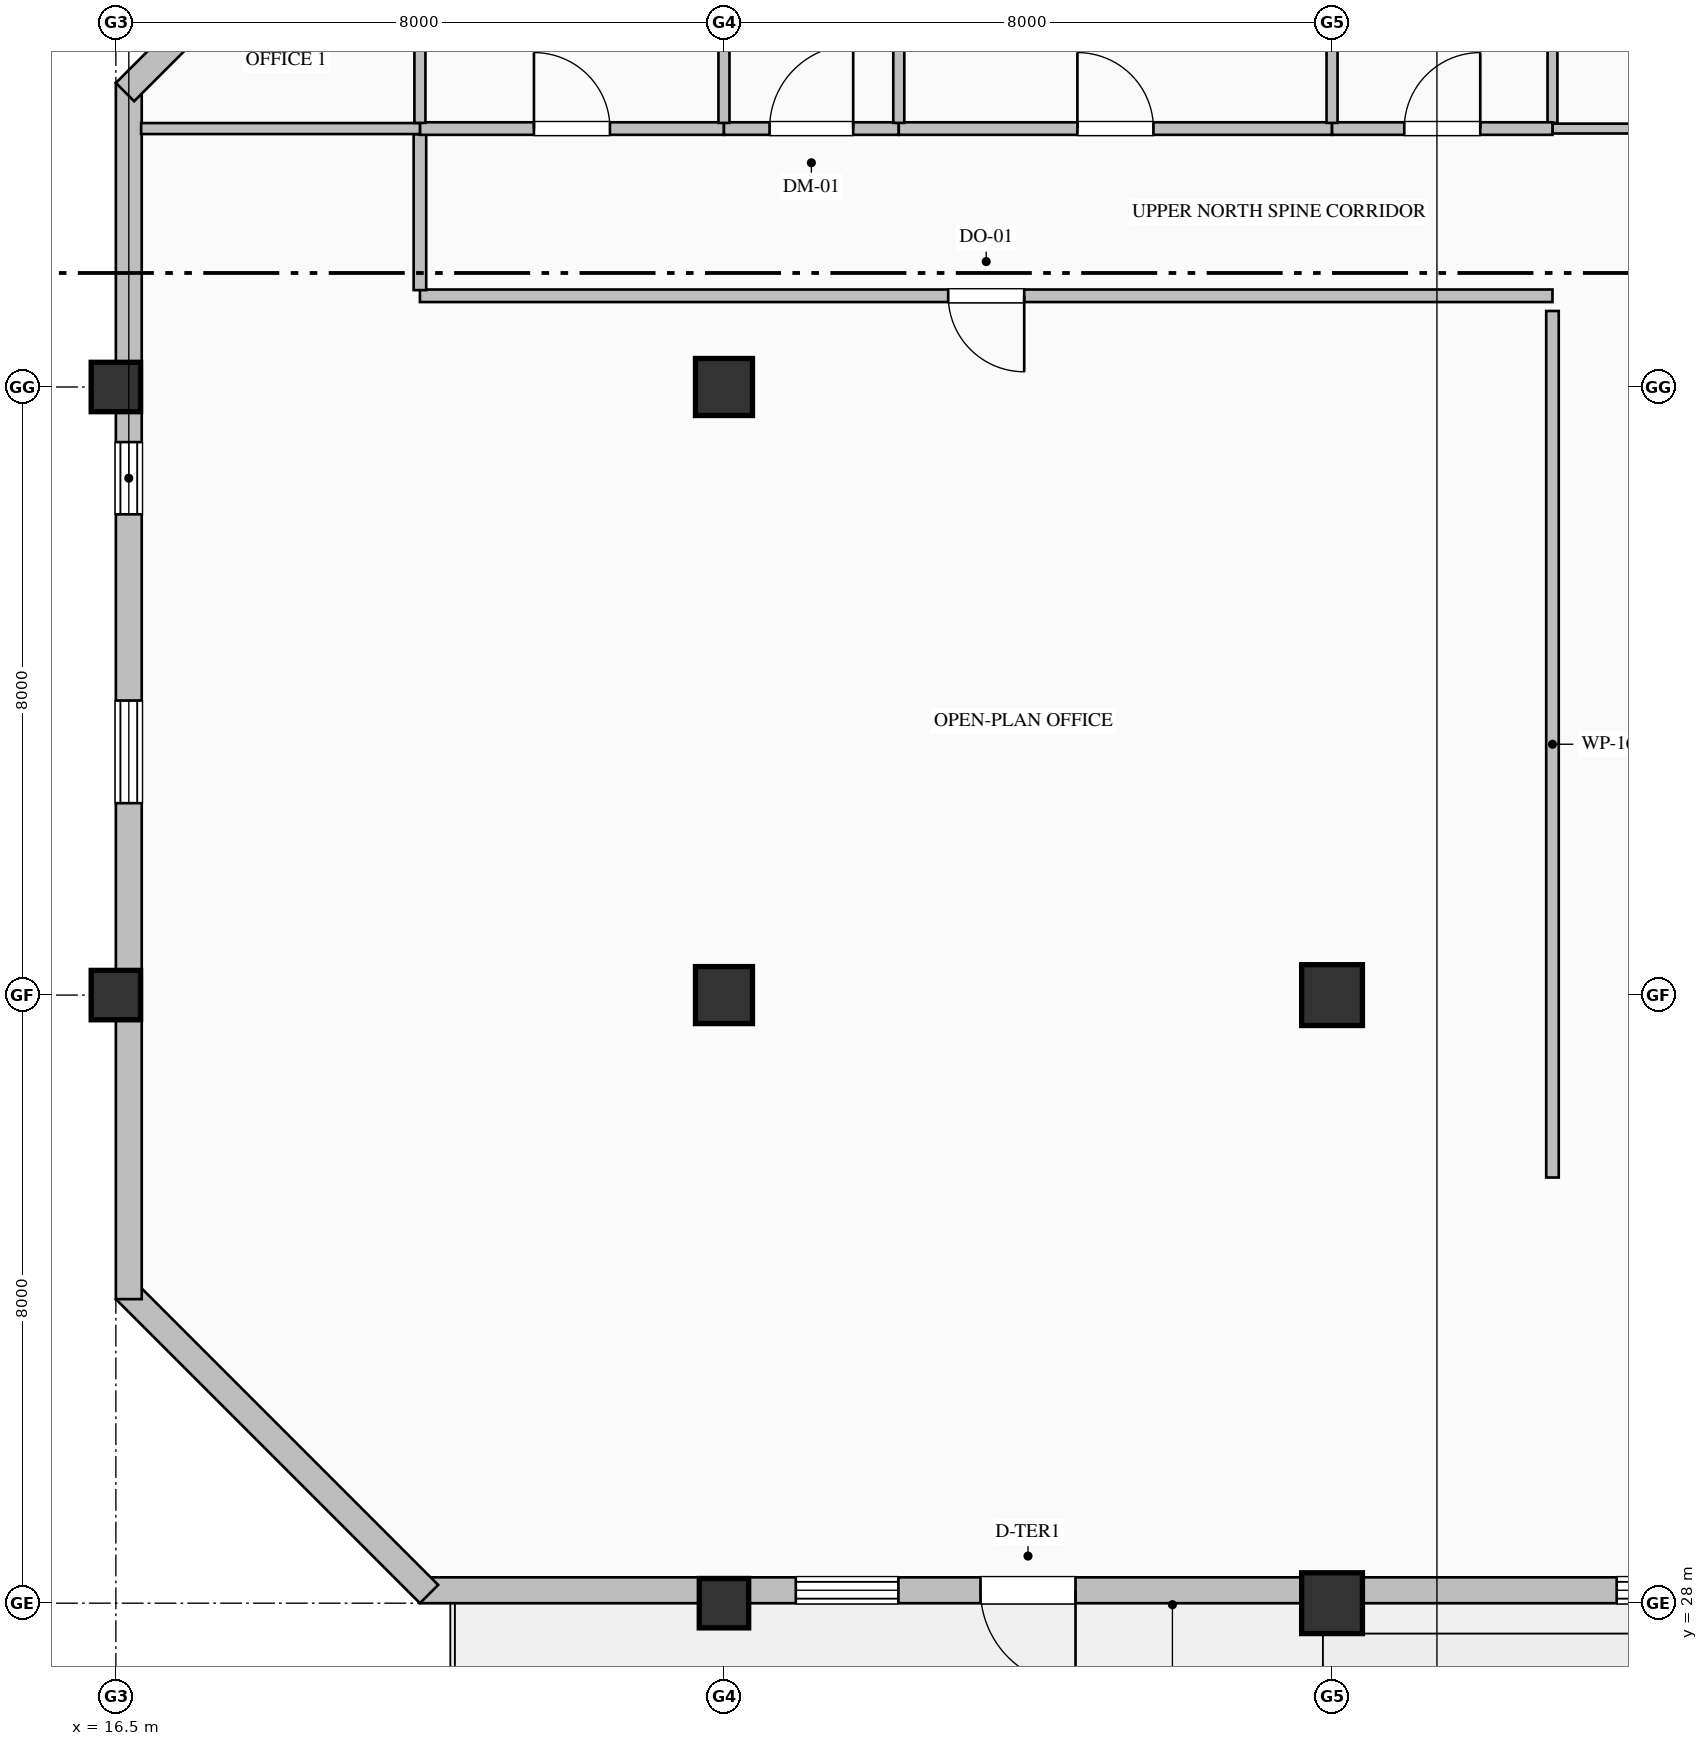
"""IFC4 building model, lengths in metres.
Left out: names, types, materials, properties, quantities, classifications, styles, units other than length and angle.
Written with IfcOpenShell. Run it as: python <this file> out.ifc"""

import sys

from ifc_helpers import new_model, si_unit, direction, frame, frame_2d, origin, origin_2d, place, context, subcontext, project, spatial, rectangle, hollow_rectangle, extrude, element, fill, save


model = new_model("IFC4")
c1 = context("Model", 3, precision=1e-05, world=origin(), true_north=direction((0.0, 1.0)))
c2 = subcontext(c1, "Body", "Model", "MODEL_VIEW")
j1 = project(units=[si_unit("LENGTHUNIT", "METRE"), si_unit("PLANEANGLEUNIT", "RADIAN")], contexts=[c1])
p1 = place(None, origin())
s1 = spatial("IfcSite", under=j1, at=p1, CompositionType="ELEMENT")
p2 = place(p1, origin())
s2 = spatial("IfcBuilding", under=s1, at=p2, CompositionType="ELEMENT")
p3 = place(p2, frame((0.0, 0.0, 291.2)))
s3 = spatial("IfcBuildingStorey", under=s2, at=p3, CompositionType="ELEMENT", Elevation=291.2)
for number, where, z_axis, x_axis in (
    (1, (16.5, 36.0, 0.0), (0.0, 0.0, 1.0), (1.0, 0.0, 0.0)),
    (2, (16.5, 44.0, 0.0), (0.0, 0.0, 1.0), (1.0, 0.0, 0.0)),
    (3, (24.5, 28.0, 0.0), (0.0, 0.0, 1.0), (1.0, 0.0, 0.0)),
):
    element("IfcColumn", number, at=place(p3, frame(where, z_axis=z_axis, x_axis=x_axis)), inside=s3, PredefinedType="COLUMN", context=c2, shape_type="SweptSolid", body=[
        extrude(hollow_rectangle(XDim=0.65, YDim=0.65, WallThickness=0.028, at=origin_2d()), origin(), (0.0, 0.0, 1.0), 4.0),
    ])
for number, where, z_axis, x_axis in (
    (4, (24.5, 36.0, 0.0), (0.0, 0.0, 1.0), (1.0, 0.0, 0.0)),
    (5, (24.5, 44.0, 0.0), (0.0, 0.0, 1.0), (1.0, 0.0, 0.0)),
):
    element("IfcColumn", number, at=place(p3, frame(where, z_axis=z_axis, x_axis=x_axis)), inside=s3, PredefinedType="COLUMN", context=c2, shape_type="SweptSolid", body=[
        extrude(rectangle(XDim=0.75, YDim=0.75, at=origin_2d()), origin(), (0.0, 0.0, 1.0), 4.0),
    ])
for number, where, z_axis, x_axis in (
    (6, (32.5, 28.0, 0.0), (0.0, 0.0, 1.0), (1.0, 0.0, 0.0)),
    (7, (32.5, 36.0, 0.0), (0.0, 0.0, 1.0), (1.0, 0.0, 0.0)),
):
    element("IfcColumn", number, at=place(p3, frame(where, z_axis=z_axis, x_axis=x_axis)), inside=s3, PredefinedType="COLUMN", context=c2, shape_type="SweptSolid", body=[
        extrude(hollow_rectangle(XDim=0.8, YDim=0.8, WallThickness=0.032, at=origin_2d()), origin(), (0.0, 0.0, 1.0), 4.0),
    ])
p4 = place(p3, frame((40.52, 28.17, 0.0), z_axis=(0.0, 0.0, 1.0), x_axis=(-1.0, 0.0, 0.0)))
e8 = element("IfcWall", 8, at=p4, inside=s3, PredefinedType="SOLIDWALL", context=c2, shape_type="SweptSolid", body=[
    extrude(rectangle(XDim=20.02, YDim=0.34, at=frame_2d((10.01, 0.0))), origin(), (0.0, 0.0, 1.0), 3.185),
])
p5 = place(p4, frame((2.925, 0.0, 0.9)))
e9 = element("IfcOpeningElement", 9, at=p5, cuts=e8, PredefinedType="OPENING", context=c2, shape_type="SweptSolid", body=[
    extrude(rectangle(XDim=1.35, YDim=1.85, at=frame_2d((0.675, 0.925))), frame((0.0, 0.18, 0.0), z_axis=(0.0, -1.0, 0.0), x_axis=(1.0, 0.0, 0.0)), (0.0, 0.0, 1.0), 0.36),
])
p6 = place(p4, frame((13.725, 0.0, 0.9)))
e10 = element("IfcOpeningElement", 10, at=p6, cuts=e8, PredefinedType="OPENING", context=c2, shape_type="SweptSolid", body=[
    extrude(rectangle(XDim=1.35, YDim=1.85, at=frame_2d((0.675, 0.925))), frame((0.0, 0.18, 0.0), z_axis=(0.0, -1.0, 0.0), x_axis=(1.0, 0.0, 0.0)), (0.0, 0.0, 1.0), 0.36),
])
p7 = place(p4, frame((11.395, 0.0, 0.0)))
e11 = element("IfcOpeningElement", 11, at=p7, cuts=e8, PredefinedType="OPENING", context=c2, shape_type="SweptSolid", body=[
    extrude(rectangle(XDim=1.25, YDim=2.25, at=frame_2d((0.625, 1.125))), frame((0.0, 0.18, 0.0), z_axis=(0.0, -1.0, 0.0), x_axis=(1.0, 0.0, 0.0)), (0.0, 0.0, 1.0), 0.36),
])
p8 = place(p3, frame((20.62, 28.12, 0.0), z_axis=(0.0, 0.0, 1.0), x_axis=(-0.707106781187, 0.707106781187, 0.0)))
e12 = element("IfcWall", 12, at=p8, inside=s3, PredefinedType="SOLIDWALL", context=c2, shape_type="SweptSolid", body=[
    extrude(rectangle(XDim=5.657, YDim=0.34, at=frame_2d((2.828, 0.0))), origin(), (0.0, 0.0, 1.0), 3.785),
])
p9 = place(p3, frame((16.67, 32.0, 0.0), z_axis=(0.0, 0.0, 1.0), x_axis=(0.0, 1.0, 0.0)))
e13 = element("IfcWall", 13, at=p9, inside=s3, PredefinedType="SOLIDWALL", context=c2, shape_type="SweptSolid", body=[
    extrude(rectangle(XDim=16.0, YDim=0.34, at=frame_2d((8.0, 0.0))), origin(), (0.0, 0.0, 1.0), 3.335),
])
p10 = place(p9, frame((6.525, 0.0, 0.9)))
e14 = element("IfcOpeningElement", 14, at=p10, cuts=e13, PredefinedType="OPENING", context=c2, shape_type="SweptSolid", body=[
    extrude(rectangle(XDim=1.35, YDim=1.85, at=frame_2d((0.675, 0.925))), frame((0.0, 0.18, 0.0), z_axis=(0.0, -1.0, 0.0), x_axis=(1.0, 0.0, 0.0)), (0.0, 0.0, 1.0), 0.36),
])
p11 = place(p9, frame((10.325, 0.0, 0.9)))
e15 = element("IfcOpeningElement", 15, at=p11, cuts=e13, PredefinedType="OPENING", context=c2, shape_type="SweptSolid", body=[
    extrude(rectangle(XDim=0.95, YDim=1.85, at=frame_2d((0.475, 0.925))), frame((0.0, 0.18, 0.0), z_axis=(0.0, -1.0, 0.0), x_axis=(1.0, 0.0, 0.0)), (0.0, 0.0, 1.0), 0.36),
])
p12 = place(p3, frame((16.62, 47.88, 0.0), z_axis=(0.0, 0.0, 1.0), x_axis=(0.707106781187, 0.707106781187, 0.0)))
e16 = element("IfcWall", 16, at=p12, inside=s3, PredefinedType="SOLIDWALL", context=c2, shape_type="SweptSolid", body=[
    extrude(rectangle(XDim=5.657, YDim=0.34, at=frame_2d((2.828, 0.0))), origin(), (0.0, 0.0, 1.0), 3.785),
])
p13 = place(p3, frame((37.8, 47.4, 0.0), z_axis=(0.0, 0.0, 1.0), x_axis=(-1.0, 0.0, 0.0)))
e17 = element("IfcWall", 17, at=p13, inside=s3, PredefinedType="PARTITIONING", context=c2, shape_type="SweptSolid", body=[
    extrude(rectangle(XDim=2.4, YDim=0.13, at=frame_2d((1.2, 0.0))), origin(), (0.0, 0.0, 1.0), 3.785),
])
p14 = place(p3, frame((35.4, 47.475, 0.0), z_axis=(0.0, 0.0, 1.0), x_axis=(0.0, 1.0, 0.0)))
e18 = element("IfcWall", 18, at=p14, inside=s3, PredefinedType="PARTITIONING", context=c2, shape_type="SweptSolid", body=[
    extrude(rectangle(XDim=4.193, YDim=0.13, at=frame_2d((2.097, 0.0))), origin(), (0.0, 0.0, 1.0), 3.785),
])
p15 = place(p3, frame((35.4, 45.2, 0.0), z_axis=(0.0, 0.0, 1.0), x_axis=(-1.0, 0.0, 0.0)))
e19 = element("IfcWall", 19, at=p15, inside=s3, PredefinedType="PARTITIONING", context=c2, shape_type="SweptSolid", body=[
    extrude(rectangle(XDim=14.9, YDim=0.165, at=frame_2d((7.45, 0.0))), origin(), (0.0, 0.0, 1.0), 3.785),
])
p16 = place(p15, frame((6.95, 0.0, 0.0)))
e20 = element("IfcOpeningElement", 20, at=p16, cuts=e19, PredefinedType="OPENING", context=c2, shape_type="SweptSolid", body=[
    extrude(rectangle(XDim=1.0, YDim=2.15, at=frame_2d((0.5, 1.075))), frame((0.0, 0.093, 0.0), z_axis=(0.0, -1.0, 0.0), x_axis=(1.0, 0.0, 0.0)), (0.0, 0.0, 1.0), 0.185),
])
p17 = place(p3, frame((20.5, 45.274, 0.0), z_axis=(0.0, 0.0, 1.0), x_axis=(0.0, 1.0, 0.0)))
e21 = element("IfcWall", 21, at=p17, inside=s3, PredefinedType="PARTITIONING", context=c2, shape_type="SweptSolid", body=[
    extrude(rectangle(XDim=2.051, YDim=0.165, at=frame_2d((1.025, 0.0))), origin(), (0.0, 0.0, 1.0), 3.785),
])
p18 = place(p3, frame((20.5, 47.4, 0.0), z_axis=(0.0, 0.0, 1.0), x_axis=(1.0, 0.0, 0.0)))
e22 = element("IfcWall", 22, at=p18, inside=s3, PredefinedType="PARTITIONING", context=c2, shape_type="SweptSolid", body=[
    extrude(rectangle(XDim=4.0, YDim=0.165, at=frame_2d((2.0, 0.0))), origin(), (0.0, 0.0, 1.0), 3.785),
])
p19 = place(p18, frame((1.5, 0.0, 0.0)))
e23 = element("IfcOpeningElement", 23, at=p19, cuts=e22, PredefinedType="OPENING", context=c2, shape_type="SweptSolid", body=[
    extrude(rectangle(XDim=1.0, YDim=2.15, at=frame_2d((0.5, 1.075))), frame((0.0, 0.093, 0.0), z_axis=(0.0, -1.0, 0.0), x_axis=(1.0, 0.0, 0.0)), (0.0, 0.0, 1.0), 0.185),
])
p20 = place(p3, frame((24.5, 47.4, 0.0), z_axis=(0.0, 0.0, 1.0), x_axis=(1.0, 0.0, 0.0)))
e24 = element("IfcWall", 24, at=p20, inside=s3, PredefinedType="PARTITIONING", context=c2, shape_type="SweptSolid", body=[
    extrude(rectangle(XDim=2.3, YDim=0.165, at=frame_2d((1.15, 0.0))), origin(), (0.0, 0.0, 1.0), 3.785),
])
p21 = place(p20, frame((0.6, 0.0, 0.0)))
e25 = element("IfcOpeningElement", 25, at=p21, cuts=e24, PredefinedType="OPENING", context=c2, shape_type="SweptSolid", body=[
    extrude(rectangle(XDim=1.1, YDim=2.2, at=frame_2d((0.55, 1.1))), frame((0.0, 0.093, 0.0), z_axis=(0.0, -1.0, 0.0), x_axis=(1.0, 0.0, 0.0)), (0.0, 0.0, 1.0), 0.185),
])
p22 = place(p3, frame((26.8, 47.4, 0.0), z_axis=(0.0, 0.0, 1.0), x_axis=(1.0, 0.0, 0.0)))
e26 = element("IfcWall", 26, at=p22, inside=s3, PredefinedType="PARTITIONING", context=c2, shape_type="SweptSolid", body=[
    extrude(rectangle(XDim=5.7, YDim=0.165, at=frame_2d((2.85, 0.0))), origin(), (0.0, 0.0, 1.0), 3.785),
])
p23 = place(p22, frame((2.35, 0.0, 0.0)))
e27 = element("IfcOpeningElement", 27, at=p23, cuts=e26, PredefinedType="OPENING", context=c2, shape_type="SweptSolid", body=[
    extrude(rectangle(XDim=1.0, YDim=2.15, at=frame_2d((0.5, 1.075))), frame((0.0, 0.093, 0.0), z_axis=(0.0, -1.0, 0.0), x_axis=(1.0, 0.0, 0.0)), (0.0, 0.0, 1.0), 0.185),
])
p24 = place(p3, frame((32.5, 47.4, 0.0), z_axis=(0.0, 0.0, 1.0), x_axis=(1.0, 0.0, 0.0)))
e28 = element("IfcWall", 28, at=p24, inside=s3, PredefinedType="PARTITIONING", context=c2, shape_type="SweptSolid", body=[
    extrude(rectangle(XDim=2.9, YDim=0.165, at=frame_2d((1.45, 0.0))), origin(), (0.0, 0.0, 1.0), 3.785),
])
p25 = place(p24, frame((0.95, 0.0, 0.0)))
e29 = element("IfcOpeningElement", 29, at=p25, cuts=e28, PredefinedType="OPENING", context=c2, shape_type="SweptSolid", body=[
    extrude(rectangle(XDim=1.0, YDim=2.15, at=frame_2d((0.5, 1.075))), frame((0.0, 0.093, 0.0), z_axis=(0.0, -1.0, 0.0), x_axis=(1.0, 0.0, 0.0)), (0.0, 0.0, 1.0), 0.185),
])
p26 = place(p3, frame((35.4, 33.6, 0.0), z_axis=(0.0, 0.0, 1.0), x_axis=(0.0, 1.0, 0.0)))
e30 = element("IfcWall", 30, at=p26, inside=s3, PredefinedType="PARTITIONING", context=c2, shape_type="SweptSolid", body=[
    extrude(rectangle(XDim=11.4, YDim=0.165, at=frame_2d((5.7, 0.0))), origin(), (0.0, 0.0, 1.0), 3.785),
])
p27 = place(p3, frame((16.832, 47.4, 0.0), z_axis=(0.0, 0.0, 1.0), x_axis=(1.0, 0.0, 0.0)))
e31 = element("IfcWall", 31, at=p27, inside=s3, PredefinedType="PARTITIONING", context=c2, shape_type="SweptSolid", body=[
    extrude(rectangle(XDim=3.668, YDim=0.145, at=frame_2d((1.834, 0.0))), origin(), (0.0, 0.0, 1.0), 3.785),
])
p28 = place(p3, frame((20.5, 51.531, 0.0), z_axis=(0.0, 0.0, 1.0), x_axis=(0.0, -1.0, 0.0)))
e32 = element("IfcWall", 32, at=p28, inside=s3, PredefinedType="PARTITIONING", context=c2, shape_type="SweptSolid", body=[
    extrude(rectangle(XDim=4.056, YDim=0.145, at=frame_2d((2.028, 0.0))), origin(), (0.0, 0.0, 1.0), 3.785),
])
p29 = place(p28, frame((1.528, 0.0, 0.0)))
e33 = element("IfcOpeningElement", 33, at=p29, cuts=e32, PredefinedType="OPENING", context=c2, shape_type="SweptSolid", body=[
    extrude(rectangle(XDim=1.0, YDim=2.15, at=frame_2d((0.5, 1.075))), frame((0.0, 0.083, 0.0), z_axis=(0.0, -1.0, 0.0), x_axis=(1.0, 0.0, 0.0)), (0.0, 0.0, 1.0), 0.165),
])
p30 = place(p3, frame((24.5, 51.668, 0.0), z_axis=(0.0, 0.0, 1.0), x_axis=(0.0, -1.0, 0.0)))
e34 = element("IfcWall", 34, at=p30, inside=s3, PredefinedType="PARTITIONING", context=c2, shape_type="SweptSolid", body=[
    extrude(rectangle(XDim=4.193, YDim=0.145, at=frame_2d((2.097, 0.0))), origin(), (0.0, 0.0, 1.0), 3.177),
])
for number, where, z_axis, x_axis in (
    (35, (26.8, 51.668, 0.0), (0.0, 0.0, 1.0), (0.0, -1.0, 0.0)),
    (36, (32.5, 51.668, 0.0), (0.0, 0.0, 1.0), (0.0, -1.0, 0.0)),
):
    element("IfcWall", number, at=place(p3, frame(where, z_axis=z_axis, x_axis=x_axis)), inside=s3, PredefinedType="PARTITIONING", context=c2, shape_type="SweptSolid", body=[
        extrude(rectangle(XDim=4.193, YDim=0.145, at=frame_2d((2.097, 0.0))), origin(), (0.0, 0.0, 1.0), 3.785),
    ])
p31 = place(p5, origin())
e37 = element("IfcWindow", 37, at=p31, inside=s3, PartitioningType="DOUBLE_PANEL_VERTICAL", PredefinedType="WINDOW", context=c2, shape_type="SweptSolid", body=[
    extrude(rectangle(XDim=1.35, YDim=1.85, at=frame_2d((0.675, 0.925))), frame((0.0, 0.15, 0.0), z_axis=(0.0, -1.0, 0.0), x_axis=(1.0, 0.0, 0.0)), (0.0, 0.0, 1.0), 0.06),
])
fill(e9, e37)
p32 = place(p6, origin())
e38 = element("IfcWindow", 38, at=p32, inside=s3, PartitioningType="DOUBLE_PANEL_VERTICAL", PredefinedType="WINDOW", context=c2, shape_type="SweptSolid", body=[
    extrude(rectangle(XDim=1.35, YDim=1.85, at=frame_2d((0.675, 0.925))), frame((0.0, 0.15, 0.0), z_axis=(0.0, -1.0, 0.0), x_axis=(1.0, 0.0, 0.0)), (0.0, 0.0, 1.0), 0.06),
])
fill(e10, e38)
p33 = place(p10, origin())
e39 = element("IfcWindow", 39, at=p33, inside=s3, PartitioningType="DOUBLE_PANEL_VERTICAL", PredefinedType="WINDOW", context=c2, shape_type="SweptSolid", body=[
    extrude(rectangle(XDim=1.35, YDim=1.85, at=frame_2d((0.675, 0.925))), frame((0.0, 0.15, 0.0), z_axis=(0.0, -1.0, 0.0), x_axis=(1.0, 0.0, 0.0)), (0.0, 0.0, 1.0), 0.06),
])
fill(e14, e39)
p34 = place(p11, origin())
e40 = element("IfcWindow", 40, at=p34, inside=s3, PartitioningType="SINGLE_PANEL", PredefinedType="WINDOW", context=c2, shape_type="SweptSolid", body=[
    extrude(rectangle(XDim=0.95, YDim=1.85, at=frame_2d((0.475, 0.925))), frame((0.0, 0.15, 0.0), z_axis=(0.0, -1.0, 0.0), x_axis=(1.0, 0.0, 0.0)), (0.0, 0.0, 1.0), 0.06),
])
fill(e15, e40)
p35 = place(p7, origin())
e41 = element("IfcDoor", 41, at=p35, inside=s3, OperationType="SINGLE_SWING_LEFT", PredefinedType="DOOR", context=c2, shape_type="SweptSolid", body=[
    extrude(rectangle(XDim=1.25, YDim=2.25, at=frame_2d((0.625, 1.125))), frame((0.0, 0.025, 0.0), z_axis=(0.0, -1.0, 0.0), x_axis=(1.0, 0.0, 0.0)), (0.0, 0.0, 1.0), 0.05),
])
fill(e11, e41)
p36 = place(p16, origin())
e42 = element("IfcDoor", 42, at=p36, inside=s3, OperationType="SINGLE_SWING_LEFT", PredefinedType="DOOR", context=c2, shape_type="SweptSolid", body=[
    extrude(rectangle(XDim=1.0, YDim=2.15, at=frame_2d((0.5, 1.075))), frame((0.0, 0.025, 0.0), z_axis=(0.0, -1.0, 0.0), x_axis=(1.0, 0.0, 0.0)), (0.0, 0.0, 1.0), 0.05),
])
fill(e20, e42)
p37 = place(p19, origin())
e43 = element("IfcDoor", 43, at=p37, inside=s3, OperationType="SINGLE_SWING_LEFT", PredefinedType="DOOR", context=c2, shape_type="SweptSolid", body=[
    extrude(rectangle(XDim=1.0, YDim=2.15, at=frame_2d((0.5, 1.075))), frame((0.0, 0.025, 0.0), z_axis=(0.0, -1.0, 0.0), x_axis=(1.0, 0.0, 0.0)), (0.0, 0.0, 1.0), 0.05),
])
fill(e23, e43)
p38 = place(p21, origin())
e44 = element("IfcDoor", 44, at=p38, inside=s3, OperationType="SINGLE_SWING_RIGHT", PredefinedType="DOOR", context=c2, shape_type="SweptSolid", body=[
    extrude(rectangle(XDim=1.1, YDim=2.2, at=frame_2d((0.55, 1.1))), frame((0.0, 0.025, 0.0), z_axis=(0.0, -1.0, 0.0), x_axis=(1.0, 0.0, 0.0)), (0.0, 0.0, 1.0), 0.05),
])
fill(e25, e44)
p39 = place(p23, origin())
e45 = element("IfcDoor", 45, at=p39, inside=s3, OperationType="SINGLE_SWING_LEFT", PredefinedType="DOOR", context=c2, shape_type="SweptSolid", body=[
    extrude(rectangle(XDim=1.0, YDim=2.15, at=frame_2d((0.5, 1.075))), frame((0.0, 0.025, 0.0), z_axis=(0.0, -1.0, 0.0), x_axis=(1.0, 0.0, 0.0)), (0.0, 0.0, 1.0), 0.05),
])
fill(e27, e45)
p40 = place(p25, origin())
e46 = element("IfcDoor", 46, at=p40, inside=s3, OperationType="SINGLE_SWING_RIGHT", PredefinedType="DOOR", context=c2, shape_type="SweptSolid", body=[
    extrude(rectangle(XDim=1.0, YDim=2.15, at=frame_2d((0.5, 1.075))), frame((0.0, 0.025, 0.0), z_axis=(0.0, -1.0, 0.0), x_axis=(1.0, 0.0, 0.0)), (0.0, 0.0, 1.0), 0.05),
])
fill(e29, e46)
save(model, sys.argv[1])
